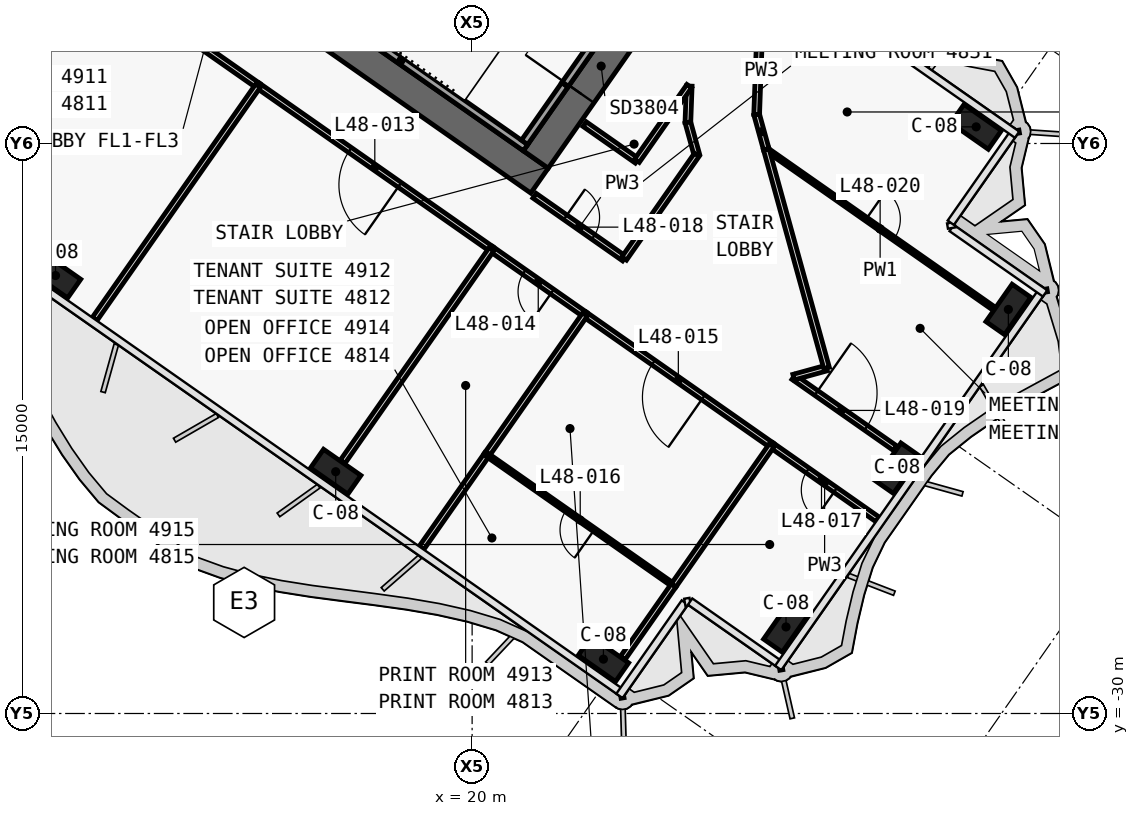
"""IFC4 building model, lengths in metres.
Left out: names, types, materials, properties, quantities, classifications, styles, units other than length and angle.
Written with IfcOpenShell. Run it as: python <this file> out.ifc"""

import sys

from ifc_helpers import new_model, si_unit, direction, frame, frame_2d, origin, origin_2d, place, context, subcontext, project, spatial, polyline, rectangle, outline, extrude, element, fill, save


model = new_model("IFC4")
c1 = context("Model", 3, precision=1e-05, world=origin(), true_north=direction((0.0, 1.0)))
c2 = subcontext(c1, "Body", "Model", "MODEL_VIEW")
j1 = project(units=[si_unit("LENGTHUNIT", "METRE"), si_unit("PLANEANGLEUNIT", "RADIAN")], contexts=[c1])
p1 = place(None, origin())
s1 = spatial("IfcSite", under=j1, at=p1, CompositionType="ELEMENT")
p2 = place(p1, origin())
s2 = spatial("IfcBuilding", under=s1, at=p2, CompositionType="ELEMENT")
p3 = place(p2, frame((0.0, 0.0, 206.1)))
s3 = spatial("IfcBuildingStorey", under=s2, at=p3, CompositionType="ELEMENT", Elevation=206.1)
p4 = place(p3, frame((-0.029, -0.712, 0.0), z_axis=(0.0, 0.0, 1.0), x_axis=(0.819151758019, -0.573576845187, 0.0)))
e1 = element("IfcWall", 1, at=p4, inside=s3, PredefinedType="SHEAR", context=c2, shape_type="SweptSolid", body=[
    extrude(outline(polyline([(26.616, 0.4), (-0.0, 0.4), (0.56, -0.4), (26.616, -0.4), (26.616, 0.4)])), origin(), (0.0, 0.0, 1.0), 3.9),
])
p5 = place(p4, frame((6.666, 0.0, 0.0)))
e2 = element("IfcOpeningElement", 2, at=p5, cuts=e1, PredefinedType="OPENING", context=c2, shape_type="SweptSolid", body=[
    extrude(rectangle(XDim=1.5, YDim=2.1, at=frame_2d((0.75, 1.05))), frame((0.0, 0.41, 0.0), z_axis=(0.0, -1.0, 0.0), x_axis=(1.0, 0.0, 0.0)), (0.0, 0.0, 1.0), 0.82),
])
p6 = place(p4, frame((12.366, 0.0, 0.0)))
e3 = element("IfcOpeningElement", 3, at=p6, cuts=e1, PredefinedType="OPENING", context=c2, shape_type="SweptSolid", body=[
    extrude(rectangle(XDim=1.5, YDim=2.1, at=frame_2d((0.75, 1.05))), frame((0.0, 0.41, 0.0), z_axis=(0.0, -1.0, 0.0), x_axis=(1.0, 0.0, 0.0)), (0.0, 0.0, 1.0), 0.82),
])
p7 = place(p3, frame((21.675, -15.421, 0.0), z_axis=(0.0, 0.0, 1.0), x_axis=(0.573581815061, 0.819148278049, 0.0)))
e4 = element("IfcWall", 4, at=p7, inside=s3, PredefinedType="SHEAR", context=c2, shape_type="SweptSolid", body=[
    extrude(outline(polyline([(9.6, 0.4), (0.0, 0.4), (0.0, -0.4), (9.6, -0.4), (9.6, 0.4)])), origin(), (0.0, 0.0, 1.0), 3.9),
])
p8 = place(p7, frame((6.3, 0.0, 0.0)))
e5 = element("IfcOpeningElement", 5, at=p8, cuts=e4, PredefinedType="OPENING", context=c2, shape_type="SweptSolid", body=[
    extrude(rectangle(XDim=1.8, YDim=2.1, at=frame_2d((0.9, 1.05))), frame((0.0, 0.41, 0.0), z_axis=(0.0, -1.0, 0.0), x_axis=(1.0, 0.0, 0.0)), (0.0, 0.0, 1.0), 0.82),
])
p9 = place(p7, frame((2.1, 0.0, 0.0)))
e6 = element("IfcOpeningElement", 6, at=p9, cuts=e4, PredefinedType="OPENING", context=c2, shape_type="SweptSolid", body=[
    extrude(rectangle(XDim=1.8, YDim=2.1, at=frame_2d((0.9, 1.05))), frame((0.0, 0.41, 0.0), z_axis=(0.0, -1.0, 0.0), x_axis=(1.0, 0.0, 0.0)), (0.0, 0.0, 1.0), 0.82),
])
for number, where, z_axis, x_axis in (
    (7, (9.038, -18.475, 0.0), (0.0, 0.0, 1.0), (0.819, -0.574, 0.0)),
    (8, (16.41, -23.637, 0.0), (0.0, 0.0, 1.0), (0.819, -0.574, 0.0)),
    (9, (23.455, -28.57, 0.0), (0.0, 0.0, 1.0), (0.819, -0.574, 0.0)),
    (10, (33.263, -14.562, 0.0), (0.0, 0.0, 1.0), (0.819, -0.574, 0.0)),
    (11, (28.26, -27.723, 0.0), (0.0, 0.0, 1.0), (0.574, 0.819, 0.0)),
    (12, (31.185, -23.545, 0.0), (0.0, 0.0, 1.0), (0.574, 0.819, 0.0)),
    (13, (34.11, -19.367, 0.0), (0.0, 0.0, 1.0), (0.574, 0.819, 0.0)),
):
    element("IfcColumn", number, at=place(p3, frame(where, z_axis=z_axis, x_axis=x_axis)), inside=s3, PredefinedType="COLUMN", context=c2, shape_type="SweptSolid", body=[
        extrude(rectangle(XDim=1.2, YDim=0.6, at=origin_2d()), origin(), (0.0, 0.0, 1.0), 3.9),
    ])
p10 = place(p3, frame((14.851, -10.521, 0.0), z_axis=(0.0, 0.0, 1.0), x_axis=(0.819141584393, -0.57359137434, 0.0)))
e14 = element("IfcWall", 14, at=p10, inside=s3, PredefinedType="SOLIDWALL", context=c2, shape_type="SweptSolid", body=[
    extrude(rectangle(XDim=8.0, YDim=0.2, at=frame_2d((4.0, 0.0))), origin(), (0.0, 0.0, 1.0), 3.62),
])
p11 = place(p3, frame((21.38, -14.97, 0.0), z_axis=(0.0, 0.0, 1.0), x_axis=(0.573559770908, 0.819163713305, 0.0)))
e15 = element("IfcWall", 15, at=p11, inside=s3, PredefinedType="SOLIDWALL", context=c2, shape_type="SweptSolid", body=[
    extrude(rectangle(XDim=1.85, YDim=0.2, at=frame_2d((0.925, 0.0))), origin(), (0.0, 0.0, 1.0), 3.62),
])
p12 = place(p3, frame((22.441, -13.455, 2.15), z_axis=(0.0, 0.0, 1.0), x_axis=(0.573591692345, 0.819141361715, 0.0)))
e16 = element("IfcWall", 16, at=p12, inside=s3, PredefinedType="SOLIDWALL", context=c2, shape_type="SweptSolid", body=[
    extrude(rectangle(XDim=1.9, YDim=0.2, at=frame_2d((0.95, 0.0))), origin(), (0.0, 0.0, 1.0), 1.47),
])
p13 = place(p3, frame((21.642, -16.375, 0.0), z_axis=(0.0, 0.0, 1.0), x_axis=(0.819152318696, -0.573576044456, 0.0)))
e17 = element("IfcWall", 17, at=p13, inside=s3, PredefinedType="PARTITIONING", context=c2, shape_type="SweptSolid", body=[
    extrude(rectangle(XDim=2.882, YDim=0.15, at=frame_2d((1.441, 0.0))), origin(), (0.0, 0.0, 1.0), 3.0),
])
p14 = place(p13, frame((0.991, 0.0, 0.0)))
e18 = element("IfcOpeningElement", 18, at=p14, cuts=e17, PredefinedType="OPENING", context=c2, shape_type="SweptSolid", body=[
    extrude(rectangle(XDim=0.9, YDim=2.1, at=frame_2d((0.45, 1.05))), frame((0.0, 0.085, 0.0), z_axis=(0.0, -1.0, 0.0), x_axis=(1.0, 0.0, 0.0)), (0.0, 0.0, 1.0), 0.17),
])
p15 = place(p3, frame((28.458, -21.147, 0.0), z_axis=(0.0, 0.0, 1.0), x_axis=(0.819143929003, -0.573588026006, 0.0)))
e19 = element("IfcWall", 19, at=p15, inside=s3, PredefinedType="PARTITIONING", context=c2, shape_type="SweptSolid", body=[
    extrude(rectangle(XDim=3.259, YDim=0.15, at=frame_2d((1.629, 0.0))), origin(), (0.0, 0.0, 1.0), 3.0),
])
p16 = place(p15, frame((0.729, 0.0, 0.0)))
e20 = element("IfcOpeningElement", 20, at=p16, cuts=e19, PredefinedType="OPENING", context=c2, shape_type="SweptSolid", body=[
    extrude(rectangle(XDim=1.6, YDim=2.1, at=frame_2d((0.8, 1.05))), frame((0.0, 0.085, 0.0), z_axis=(0.0, -1.0, 0.0), x_axis=(1.0, 0.0, 0.0)), (0.0, 0.0, 1.0), 0.17),
])
p17 = place(p3, frame((14.369, -13.479, 0.0), z_axis=(0.0, 0.0, 1.0), x_axis=(-0.819154371039, 0.573573113393, 0.0)))
e21 = element("IfcWall", 21, at=p17, inside=s3, PredefinedType="PARTITIONING", context=c2, shape_type="SweptSolid", body=[
    extrude(rectangle(XDim=10.502, YDim=0.15, at=frame_2d((5.251, 0.0))), origin(), (0.0, 0.0, 1.0), 3.0),
])
p18 = place(p17, frame((4.451, 0.0, 0.0)))
e22 = element("IfcOpeningElement", 22, at=p18, cuts=e21, PredefinedType="OPENING", context=c2, shape_type="SweptSolid", body=[
    extrude(rectangle(XDim=1.6, YDim=2.1, at=frame_2d((0.8, 1.05))), frame((0.0, 0.085, 0.0), z_axis=(0.0, -1.0, 0.0), x_axis=(1.0, 0.0, 0.0)), (0.0, 0.0, 1.0), 0.17),
])
p19 = place(p3, frame((20.513, -17.781, 0.0), z_axis=(0.0, 0.0, 1.0), x_axis=(-0.819164661457, 0.573558416746, 0.0)))
e23 = element("IfcWall", 23, at=p19, inside=s3, PredefinedType="PARTITIONING", context=c2, shape_type="SweptSolid", body=[
    extrude(rectangle(XDim=7.504, YDim=0.15, at=frame_2d((3.752, 0.0))), origin(), (0.0, 0.0, 1.0), 3.0),
])
p20 = place(p19, frame((2.952, 0.0, 0.0)))
e24 = element("IfcOpeningElement", 24, at=p20, cuts=e23, PredefinedType="OPENING", context=c2, shape_type="SweptSolid", body=[
    extrude(rectangle(XDim=1.6, YDim=2.1, at=frame_2d((0.8, 1.05))), frame((0.0, 0.085, 0.0), z_axis=(0.0, -1.0, 0.0), x_axis=(1.0, 0.0, 0.0)), (0.0, 0.0, 1.0), 0.17),
])
p21 = place(p3, frame((22.97, -19.502, 0.0), z_axis=(0.0, 0.0, 1.0), x_axis=(-0.819128818764, 0.573609604409, 0.0)))
e25 = element("IfcWall", 25, at=p21, inside=s3, PredefinedType="PARTITIONING", context=c2, shape_type="SweptSolid", body=[
    extrude(rectangle(XDim=3.004, YDim=0.15, at=frame_2d((1.502, 0.0))), origin(), (0.0, 0.0, 1.0), 3.0),
])
p22 = place(p21, frame((1.052, 0.0, 0.0)))
e26 = element("IfcOpeningElement", 26, at=p22, cuts=e25, PredefinedType="OPENING", context=c2, shape_type="SweptSolid", body=[
    extrude(rectangle(XDim=0.9, YDim=2.1, at=frame_2d((0.45, 1.05))), frame((0.0, 0.085, 0.0), z_axis=(0.0, -1.0, 0.0), x_axis=(1.0, 0.0, 0.0)), (0.0, 0.0, 1.0), 0.17),
])
p23 = place(p3, frame((27.885, -22.944, 0.0), z_axis=(0.0, 0.0, 1.0), x_axis=(-0.819145946981, 0.573585144111, 0.0)))
e27 = element("IfcWall", 27, at=p23, inside=s3, PredefinedType="PARTITIONING", context=c2, shape_type="SweptSolid", body=[
    extrude(rectangle(XDim=6.004, YDim=0.15, at=frame_2d((3.002, 0.0))), origin(), (0.0, 0.0, 1.0), 3.0),
])
p24 = place(p23, frame((2.202, 0.0, 0.0)))
e28 = element("IfcOpeningElement", 28, at=p24, cuts=e27, PredefinedType="OPENING", context=c2, shape_type="SweptSolid", body=[
    extrude(rectangle(XDim=1.6, YDim=2.1, at=frame_2d((0.8, 1.05))), frame((0.0, 0.085, 0.0), z_axis=(0.0, -1.0, 0.0), x_axis=(1.0, 0.0, 0.0)), (0.0, 0.0, 1.0), 0.17),
])
p25 = place(p3, frame((30.669, -24.893, 0.0), z_axis=(0.0, 0.0, 1.0), x_axis=(-0.819147629048, 0.573582741917, 0.0)))
e29 = element("IfcWall", 29, at=p25, inside=s3, PredefinedType="PARTITIONING", context=c2, shape_type="SweptSolid", body=[
    extrude(rectangle(XDim=3.402, YDim=0.15, at=frame_2d((1.701, 0.0))), origin(), (0.0, 0.0, 1.0), 2.9),
])
p26 = place(p25, frame((1.351, 0.0, 0.0)))
e30 = element("IfcOpeningElement", 30, at=p26, cuts=e29, PredefinedType="OPENING", context=c2, shape_type="SweptSolid", body=[
    extrude(rectangle(XDim=0.9, YDim=2.1, at=frame_2d((0.45, 1.05))), frame((0.0, 0.085, 0.0), z_axis=(0.0, -1.0, 0.0), x_axis=(1.0, 0.0, 0.0)), (0.0, 0.0, 1.0), 0.17),
])
p27 = place(p3, frame((25.713, -13.49, 0.0), z_axis=(0.0, 0.0, 1.0), x_axis=(-0.036992788415, -0.999315532555, 0.0)))
e31 = element("IfcWall", 31, at=p27, inside=s3, PredefinedType="PARTITIONING", context=c2, shape_type="SweptSolid", body=[
    extrude(rectangle(XDim=0.957, YDim=0.15, at=frame_2d((0.479, 0.0))), origin(), (0.0, 0.0, 1.0), 3.62),
])
p28 = place(p3, frame((25.677, -14.446, 0.0), z_axis=(0.0, 0.0, 1.0), x_axis=(0.266017607409, -0.963968169883, 0.0)))
e32 = element("IfcWall", 32, at=p28, inside=s3, PredefinedType="PARTITIONING", context=c2, shape_type="SweptSolid", body=[
    extrude(rectangle(XDim=0.883, YDim=0.15, at=frame_2d((0.441, 0.0))), origin(), (0.0, 0.0, 1.0), 3.62),
])
p29 = place(p3, frame((25.912, -15.297, 0.0), z_axis=(0.0, 0.0, 1.0), x_axis=(-0.573609853161, -0.819128644571, 0.0)))
e33 = element("IfcWall", 33, at=p29, inside=s3, PredefinedType="PARTITIONING", context=c2, shape_type="SweptSolid", body=[
    extrude(rectangle(XDim=3.332, YDim=0.15, at=frame_2d((1.666, 0.0))), origin(), (0.0, 0.0, 1.0), 3.62),
])
p30 = place(p3, frame((22.961, -14.49, 0.0), z_axis=(0.0, 0.0, 1.0), x_axis=(0.819109000826, -0.573637903879, 0.0)))
e34 = element("IfcWall", 34, at=p30, inside=s3, PredefinedType="PARTITIONING", context=c2, shape_type="SweptSolid", body=[
    extrude(rectangle(XDim=1.68, YDim=0.15, at=frame_2d((0.84, 0.0))), origin(), (0.0, 0.0, 1.0), 3.62),
])
p31 = place(p3, frame((24.337, -15.454, 0.0), z_axis=(0.0, 0.0, 1.0), x_axis=(0.573605802776, 0.819131480912, 0.0)))
e35 = element("IfcWall", 35, at=p31, inside=s3, PredefinedType="PARTITIONING", context=c2, shape_type="SweptSolid", body=[
    extrude(rectangle(XDim=2.398, YDim=0.15, at=frame_2d((1.199, 0.0))), origin(), (0.0, 0.0, 1.0), 3.62),
])
p32 = place(p3, frame((27.739, -15.149, 0.0), z_axis=(0.0, 0.0, 1.0), x_axis=(0.819156688441, -0.573569803757, 0.0)))
e36 = element("IfcWall", 36, at=p32, inside=s3, PredefinedType="PARTITIONING", context=c2, shape_type="SweptSolid", body=[
    extrude(rectangle(XDim=7.319, YDim=0.1, at=frame_2d((3.659, 0.0))), origin(), (0.0, 0.0, 1.0), 3.0),
])
p33 = place(p32, frame((3.209, 0.0, 0.0)))
e37 = element("IfcOpeningElement", 37, at=p33, cuts=e36, PredefinedType="OPENING", context=c2, shape_type="SweptSolid", body=[
    extrude(rectangle(XDim=0.9, YDim=2.1, at=frame_2d((0.45, 1.05))), frame((0.0, 0.06, 0.0), z_axis=(0.0, -1.0, 0.0), x_axis=(1.0, 0.0, 0.0)), (0.0, 0.0, 1.0), 0.12),
])
p34 = place(p3, frame((27.739, -15.149, 0.0), z_axis=(0.0, 0.0, 1.0), x_axis=(-0.265970250562, 0.963981237274, 0.0)))
e38 = element("IfcWall", 38, at=p34, inside=s3, PredefinedType="PARTITIONING", context=c2, shape_type="SweptSolid", body=[
    extrude(rectangle(XDim=0.948, YDim=0.15, at=frame_2d((0.474, 0.0))), origin(), (0.0, 0.0, 1.0), 3.62),
])
p35 = place(p3, frame((27.487, -14.235, 0.0), z_axis=(0.0, 0.0, 1.0), x_axis=(0.036938656061, 0.999317534965, 0.0)))
e39 = element("IfcWall", 39, at=p35, inside=s3, PredefinedType="PARTITIONING", context=c2, shape_type="SweptSolid", body=[
    extrude(rectangle(XDim=3.463, YDim=0.15, at=frame_2d((1.732, 0.0))), origin(), (0.0, 0.0, 1.0), 3.0),
])
p36 = place(p3, frame((28.459, -21.148, 0.0), z_axis=(0.0, 0.0, 1.0), x_axis=(0.964090868689, 0.265572583131, 0.0)))
e40 = element("IfcWall", 40, at=p36, inside=s3, PredefinedType="PARTITIONING", context=c2, shape_type="SweptSolid", body=[
    extrude(rectangle(XDim=0.9, YDim=0.15, at=frame_2d((0.45, 0.0))), origin(), (0.0, 0.0, 1.0), 3.0),
])
p37 = place(p3, frame((29.327, -20.909, 0.0), z_axis=(0.0, 0.0, 1.0), x_axis=(-0.265851730348, 0.964013930123, 0.0)))
e41 = element("IfcWall", 41, at=p37, inside=s3, PredefinedType="PARTITIONING", context=c2, shape_type="SweptSolid", body=[
    extrude(rectangle(XDim=5.974, YDim=0.15, at=frame_2d((2.987, 0.0))), origin(), (0.0, 0.0, 1.0), 3.0),
])
p38 = place(p3, frame((14.367, -13.479, 0.0), z_axis=(0.0, 0.0, 1.0), x_axis=(-0.573575945067, -0.81915238829, 0.0)))
e42 = element("IfcWall", 42, at=p38, inside=s3, PredefinedType="PARTITIONING", context=c2, shape_type="SweptSolid", body=[
    extrude(rectangle(XDim=7.5, YDim=0.15, at=frame_2d((3.75, 0.0))), origin(), (0.0, 0.0, 1.0), 2.9),
])
p39 = place(p3, frame((20.511, -17.78, 0.0), z_axis=(0.0, 0.0, 1.0), x_axis=(-0.573577493031, -0.819151304393, 0.0)))
e43 = element("IfcWall", 43, at=p39, inside=s3, PredefinedType="PARTITIONING", context=c2, shape_type="SweptSolid", body=[
    extrude(rectangle(XDim=6.83, YDim=0.15, at=frame_2d((3.415, 0.0))), origin(), (0.0, 0.0, 1.0), 3.0),
])
p40 = place(p3, frame((20.388, -23.186, 0.0), z_axis=(0.0, 0.0, 1.0), x_axis=(-0.573555162214, -0.819166940189, 0.0)))
e44 = element("IfcWall", 44, at=p40, inside=s3, PredefinedType="PARTITIONING", context=c2, shape_type="SweptSolid", body=[
    extrude(rectangle(XDim=3.001, YDim=0.15, at=frame_2d((1.5, 0.0))), origin(), (0.0, 0.0, 1.0), 2.9),
])
p41 = place(p3, frame((22.969, -19.501, 0.0), z_axis=(0.0, 0.0, 1.0), x_axis=(-0.573589723117, -0.819142740634, 0.0)))
e45 = element("IfcWall", 45, at=p41, inside=s3, PredefinedType="PARTITIONING", context=c2, shape_type="SweptSolid", body=[
    extrude(rectangle(XDim=4.502, YDim=0.15, at=frame_2d((2.251, 0.0))), origin(), (0.0, 0.0, 1.0), 3.62),
])
p42 = place(p3, frame((25.302, -26.629, 0.0), z_axis=(0.0, 0.0, 1.0), x_axis=(-0.819149710902, 0.573579768758, 0.0)))
e46 = element("IfcWall", 46, at=p42, inside=s3, PredefinedType="PARTITIONING", context=c2, shape_type="SweptSolid", body=[
    extrude(rectangle(XDim=6.0, YDim=0.1, at=frame_2d((3.0, 0.0))), origin(), (0.0, 0.0, 1.0), 3.0),
])
p43 = place(p42, frame((2.55, 0.0, 0.0)))
e47 = element("IfcOpeningElement", 47, at=p43, cuts=e46, PredefinedType="OPENING", context=c2, shape_type="SweptSolid", body=[
    extrude(rectangle(XDim=0.9, YDim=2.1, at=frame_2d((0.45, 1.05))), frame((0.0, 0.06, 0.0), z_axis=(0.0, -1.0, 0.0), x_axis=(1.0, 0.0, 0.0)), (0.0, 0.0, 1.0), 0.12),
])
p44 = place(p3, frame((25.302, -26.629, 0.0), z_axis=(0.0, 0.0, 1.0), x_axis=(-0.573617113266, -0.819123560501, 0.0)))
e48 = element("IfcWall", 48, at=p44, inside=s3, PredefinedType="PARTITIONING", context=c2, shape_type="SweptSolid", body=[
    extrude(rectangle(XDim=2.329, YDim=0.15, at=frame_2d((1.165, 0.0))), origin(), (0.0, 0.0, 1.0), 2.9),
])
p45 = place(p3, frame((27.884, -22.942, 0.0), z_axis=(0.0, 0.0, 1.0), x_axis=(-0.573560650686, -0.819163097304, 0.0)))
e49 = element("IfcWall", 49, at=p45, inside=s3, PredefinedType="PARTITIONING", context=c2, shape_type="SweptSolid", body=[
    extrude(rectangle(XDim=4.5, YDim=0.15, at=frame_2d((2.25, 0.0))), origin(), (0.0, 0.0, 1.0), 3.62),
])
p46 = place(p9, origin())
e50 = element("IfcDoor", 50, at=p46, inside=s3, OperationType="DOUBLE_DOOR_SINGLE_SWING", PredefinedType="DOOR", context=c2, shape_type="SweptSolid", body=[
    extrude(rectangle(XDim=1.8, YDim=2.1, at=frame_2d((0.9, 1.05))), frame((0.0, 0.025, 0.0), z_axis=(0.0, -1.0, 0.0), x_axis=(1.0, 0.0, 0.0)), (0.0, 0.0, 1.0), 0.05),
])
fill(e6, e50)
p47 = place(p20, origin())
e51 = element("IfcDoor", 51, at=p47, inside=s3, OperationType="DOUBLE_DOOR_SINGLE_SWING", PredefinedType="DOOR", context=c2, shape_type="SweptSolid", body=[
    extrude(rectangle(XDim=1.6, YDim=2.1, at=frame_2d((0.8, 1.05))), frame((0.0, 0.025, 0.0), z_axis=(0.0, -1.0, 0.0), x_axis=(1.0, 0.0, 0.0)), (0.0, 0.0, 1.0), 0.05),
])
fill(e24, e51)
p48 = place(p22, origin())
e52 = element("IfcDoor", 52, at=p48, inside=s3, OperationType="SINGLE_SWING_LEFT", PredefinedType="DOOR", context=c2, shape_type="SweptSolid", body=[
    extrude(rectangle(XDim=0.9, YDim=2.1, at=frame_2d((0.45, 1.05))), frame((0.0, 0.025, 0.0), z_axis=(0.0, -1.0, 0.0), x_axis=(1.0, 0.0, 0.0)), (0.0, 0.0, 1.0), 0.05),
])
fill(e26, e52)
p49 = place(p24, origin())
e53 = element("IfcDoor", 53, at=p49, inside=s3, OperationType="DOUBLE_DOOR_SINGLE_SWING", PredefinedType="DOOR", context=c2, shape_type="SweptSolid", body=[
    extrude(rectangle(XDim=1.6, YDim=2.1, at=frame_2d((0.8, 1.05))), frame((0.0, 0.025, 0.0), z_axis=(0.0, -1.0, 0.0), x_axis=(1.0, 0.0, 0.0)), (0.0, 0.0, 1.0), 0.05),
])
fill(e28, e53)
p50 = place(p43, origin())
e54 = element("IfcDoor", 54, at=p50, inside=s3, OperationType="SINGLE_SWING_RIGHT", PredefinedType="DOOR", context=c2, shape_type="SweptSolid", body=[
    extrude(rectangle(XDim=0.9, YDim=2.1, at=frame_2d((0.45, 1.05))), frame((0.0, 0.025, 0.0), z_axis=(0.0, -1.0, 0.0), x_axis=(1.0, 0.0, 0.0)), (0.0, 0.0, 1.0), 0.05),
])
fill(e47, e54)
p51 = place(p26, origin())
e55 = element("IfcDoor", 55, at=p51, inside=s3, OperationType="SINGLE_SWING_LEFT", PredefinedType="DOOR", context=c2, shape_type="SweptSolid", body=[
    extrude(rectangle(XDim=0.9, YDim=2.1, at=frame_2d((0.45, 1.05))), frame((0.0, 0.025, 0.0), z_axis=(0.0, -1.0, 0.0), x_axis=(1.0, 0.0, 0.0)), (0.0, 0.0, 1.0), 0.05),
])
fill(e30, e55)
p52 = place(p14, origin())
e56 = element("IfcDoor", 56, at=p52, inside=s3, OperationType="SINGLE_SWING_RIGHT", PredefinedType="DOOR", context=c2, shape_type="SweptSolid", body=[
    extrude(rectangle(XDim=0.9, YDim=2.1, at=frame_2d((0.45, 1.05))), frame((0.0, 0.025, 0.0), z_axis=(0.0, -1.0, 0.0), x_axis=(1.0, 0.0, 0.0)), (0.0, 0.0, 1.0), 0.05),
])
fill(e18, e56)
p53 = place(p16, origin())
e57 = element("IfcDoor", 57, at=p53, inside=s3, OperationType="DOUBLE_DOOR_SINGLE_SWING", PredefinedType="DOOR", context=c2, shape_type="SweptSolid", body=[
    extrude(rectangle(XDim=1.6, YDim=2.1, at=frame_2d((0.8, 1.05))), frame((0.0, 0.025, 0.0), z_axis=(0.0, -1.0, 0.0), x_axis=(1.0, 0.0, 0.0)), (0.0, 0.0, 1.0), 0.05),
])
fill(e20, e57)
p54 = place(p33, origin())
e58 = element("IfcDoor", 58, at=p54, inside=s3, OperationType="SINGLE_SWING_LEFT", PredefinedType="DOOR", context=c2, shape_type="SweptSolid", body=[
    extrude(rectangle(XDim=0.9, YDim=2.1, at=frame_2d((0.45, 1.05))), frame((0.0, 0.025, 0.0), z_axis=(0.0, -1.0, 0.0), x_axis=(1.0, 0.0, 0.0)), (0.0, 0.0, 1.0), 0.05),
])
fill(e37, e58)
save(model, sys.argv[1])
